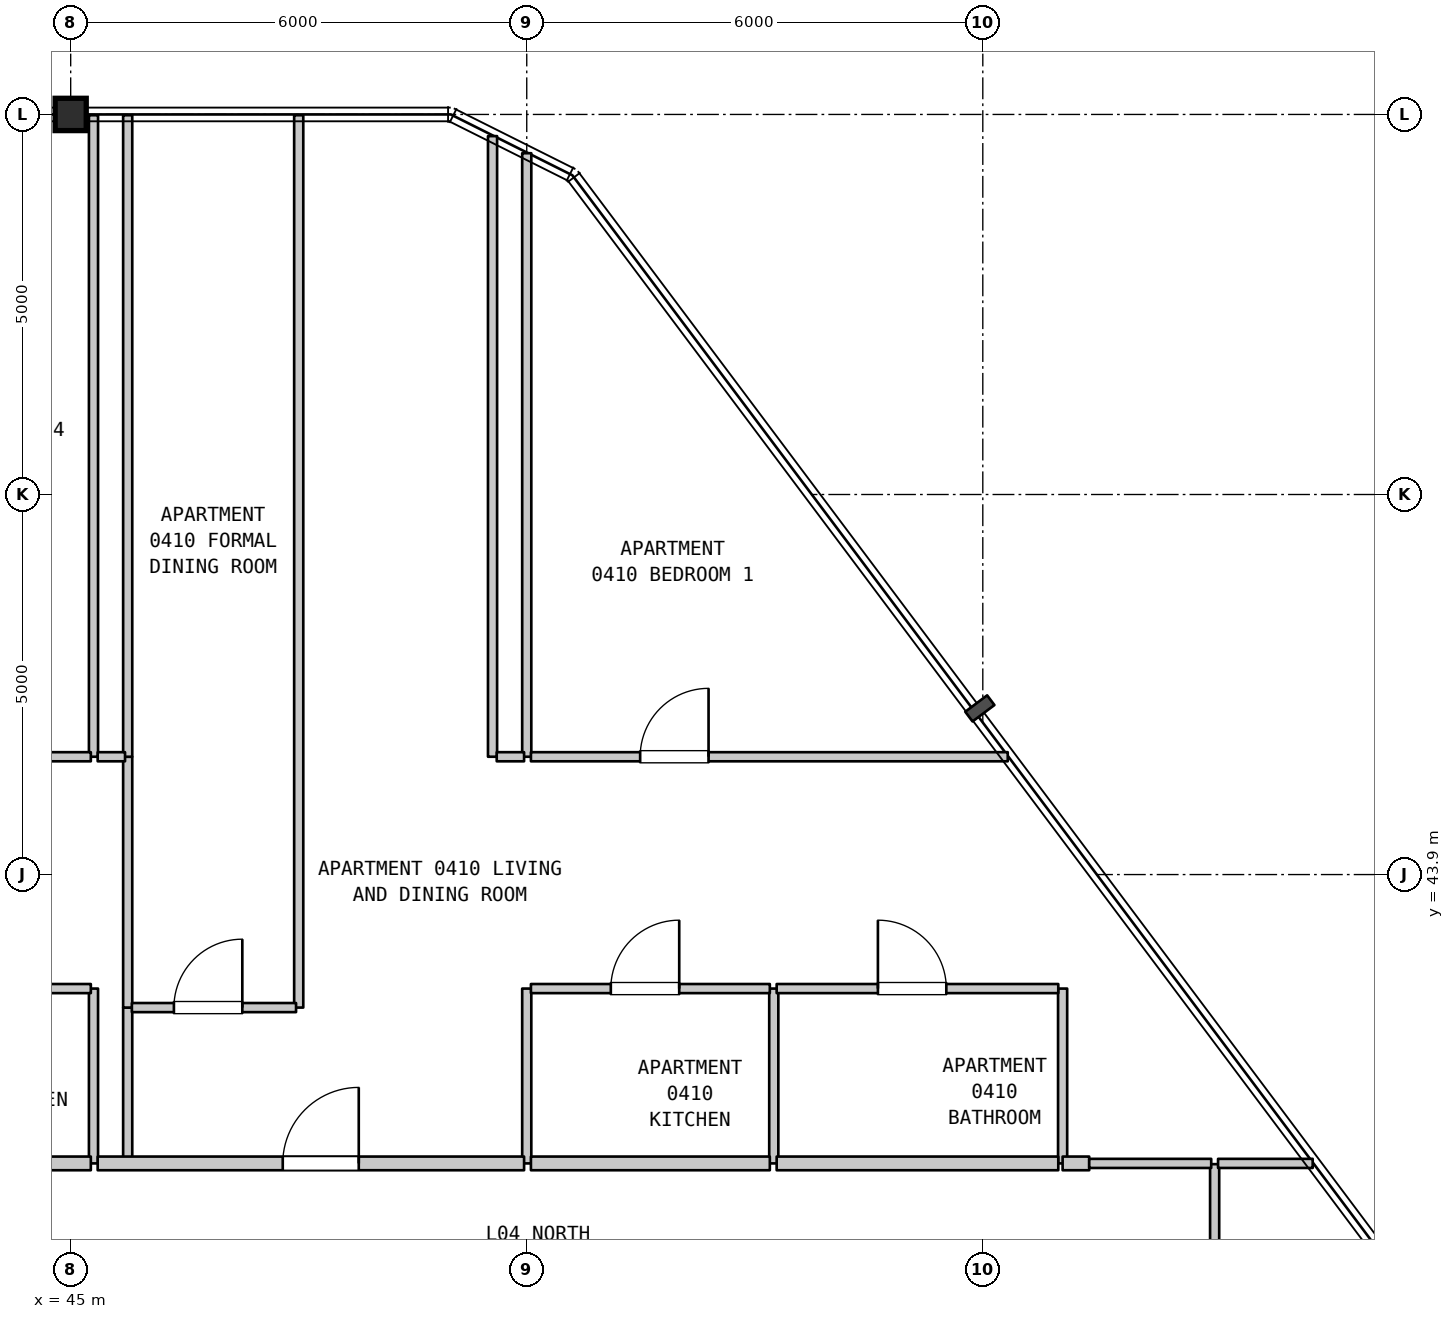
"""IFC4 building model, lengths in metres.
Left out: names, types, materials, properties, quantities, classifications, styles, units other than length and angle.
Written with IfcOpenShell. Run it as: python <this file> out.ifc"""

import sys

from ifc_helpers import new_model, si_unit, direction, frame, frame_2d, origin, origin_2d, place, context, subcontext, project, spatial, rectangle, i_section, extrude, element, fill, save


model = new_model("IFC4")
c1 = context("Model", 3, precision=1e-05, world=origin(), true_north=direction((0.0, 1.0)))
c2 = subcontext(c1, "Body", "Model", "MODEL_VIEW")
j1 = project(units=[si_unit("LENGTHUNIT", "METRE"), si_unit("PLANEANGLEUNIT", "RADIAN")], contexts=[c1])
p1 = place(None, origin())
s1 = spatial("IfcSite", under=j1, at=p1, CompositionType="ELEMENT")
p2 = place(p1, origin())
s2 = spatial("IfcBuilding", under=s1, at=p2, CompositionType="ELEMENT")
p3 = place(p2, frame((0.0, 0.0, 24.0)))
s3 = spatial("IfcBuildingStorey", under=s2, at=p3, CompositionType="ELEMENT", Elevation=24.0)
p4 = place(p3, frame((45.0, 53.9, 0.0), z_axis=(0.0, 0.0, 1.0), x_axis=(1.0, 0.0, 0.0)))
e1 = element("IfcColumn", 1, at=p4, inside=s3, PredefinedType="COLUMN", context=c2, shape_type="SweptSolid", body=[
    extrude(i_section(OverallWidth=0.409, OverallDepth=0.425, WebThickness=0.032, FlangeThickness=0.052, FilletRadius=0.015, at=origin_2d()), origin(), (0.0, 0.0, 1.0), 3.7),
])
p5 = place(p3, frame((45.3, 40.1, 0.0), z_axis=(0.0, 0.0, 1.0), x_axis=(0.0, 1.0, 0.0)))
e2 = element("IfcWall", 2, at=p5, inside=s3, PredefinedType="PARTITIONING", context=c2, shape_type="SweptSolid", body=[
    extrude(rectangle(XDim=2.3, YDim=0.12, at=frame_2d((1.15, 0.0))), origin(), (0.0, 0.0, 1.0), 3.385),
])
p6 = place(p3, frame((45.3, 45.45, 0.0), z_axis=(0.0, 0.0, 1.0), x_axis=(0.0, 1.0, 0.0)))
e3 = element("IfcWall", 3, at=p6, inside=s3, PredefinedType="PARTITIONING", context=c2, shape_type="SweptSolid", body=[
    extrude(rectangle(XDim=8.44, YDim=0.12, at=frame_2d((4.22, 0.0))), origin(), (0.0, 0.0, 1.0), 3.385),
])
p7 = place(p3, frame((45.75, 40.1, 0.0), z_axis=(0.0, 0.0, 1.0), x_axis=(0.0, 1.0, 0.0)))
e4 = element("IfcWall", 4, at=p7, inside=s3, PredefinedType="PARTITIONING", context=c2, shape_type="SweptSolid", body=[
    extrude(rectangle(XDim=2.05, YDim=0.12, at=frame_2d((1.025, 0.0))), origin(), (0.0, 0.0, 1.0), 3.385),
])
p8 = place(p3, frame((45.75, 42.15, 0.0), z_axis=(0.0, 0.0, 1.0), x_axis=(0.0, 1.0, 0.0)))
e5 = element("IfcWall", 5, at=p8, inside=s3, PredefinedType="PARTITIONING", context=c2, shape_type="SweptSolid", body=[
    extrude(rectangle(XDim=3.3, YDim=0.12, at=frame_2d((1.65, 0.0))), origin(), (0.0, 0.0, 1.0), 3.385),
])
p9 = place(p3, frame((45.75, 45.45, 0.0), z_axis=(0.0, 0.0, 1.0), x_axis=(0.0, 1.0, 0.0)))
e6 = element("IfcWall", 6, at=p9, inside=s3, PredefinedType="PARTITIONING", context=c2, shape_type="SweptSolid", body=[
    extrude(rectangle(XDim=8.44, YDim=0.12, at=frame_2d((4.22, 0.0))), origin(), (0.0, 0.0, 1.0), 3.385),
])
p10 = place(p3, frame((48.0, 42.15, 0.0), z_axis=(0.0, 0.0, 1.0), x_axis=(0.0, 1.0, 0.0)))
e7 = element("IfcWall", 7, at=p10, inside=s3, PredefinedType="PARTITIONING", context=c2, shape_type="SweptSolid", body=[
    extrude(rectangle(XDim=11.74, YDim=0.12, at=frame_2d((5.87, 0.0))), origin(), (0.0, 0.0, 1.0), 3.385),
])
p11 = place(p3, frame((50.55, 45.45, 0.0), z_axis=(0.0, 0.0, 1.0), x_axis=(0.0, 1.0, 0.0)))
e8 = element("IfcWall", 8, at=p11, inside=s3, PredefinedType="PARTITIONING", context=c2, shape_type="SweptSolid", body=[
    extrude(rectangle(XDim=8.165, YDim=0.12, at=frame_2d((4.083, 0.0))), origin(), (0.0, 0.0, 1.0), 3.385),
])
p12 = place(p3, frame((51.0, 40.1, 0.0), z_axis=(0.0, 0.0, 1.0), x_axis=(0.0, 1.0, 0.0)))
e9 = element("IfcWall", 9, at=p12, inside=s3, PredefinedType="PARTITIONING", context=c2, shape_type="SweptSolid", body=[
    extrude(rectangle(XDim=2.3, YDim=0.12, at=frame_2d((1.15, 0.0))), origin(), (0.0, 0.0, 1.0), 3.385),
])
p13 = place(p3, frame((51.0, 45.45, 0.0), z_axis=(0.0, 0.0, 1.0), x_axis=(0.0, 1.0, 0.0)))
e10 = element("IfcWall", 10, at=p13, inside=s3, PredefinedType="PARTITIONING", context=c2, shape_type="SweptSolid", body=[
    extrude(rectangle(XDim=7.94, YDim=0.12, at=frame_2d((3.97, 0.0))), origin(), (0.0, 0.0, 1.0), 3.385),
])
for number, where, z_axis, x_axis in (
    (11, (54.25, 40.1, 0.0), (0.0, 0.0, 1.0), (0.0, 1.0, 0.0)),
    (12, (58.05, 40.1, 0.0), (0.0, 0.0, 1.0), (0.0, 1.0, 0.0)),
):
    element("IfcWall", number, at=place(p3, frame(where, z_axis=z_axis, x_axis=x_axis)), inside=s3, PredefinedType="PARTITIONING", context=c2, shape_type="SweptSolid", body=[
        extrude(rectangle(XDim=2.3, YDim=0.12, at=frame_2d((1.15, 0.0))), origin(), (0.0, 0.0, 1.0), 3.385),
    ])
p14 = place(p3, frame((60.05, 37.89, 0.0), z_axis=(0.0, 0.0, 1.0), x_axis=(0.0, 1.0, 0.0)))
e13 = element("IfcWall", 13, at=p14, inside=s3, PredefinedType="PARTITIONING", context=c2, shape_type="SweptSolid", body=[
    extrude(rectangle(XDim=2.2, YDim=0.12, at=frame_2d((1.1, 0.0))), origin(), (0.0, 0.0, 1.0), 3.385),
])
p15 = place(p3, frame((40.639, 40.1, 0.0), z_axis=(0.0, 0.0, 1.0), x_axis=(1.0, 0.0, 0.0)))
e14 = element("IfcWall", 14, at=p15, inside=s3, PredefinedType="STANDARD", context=c2, shape_type="SweptSolid", body=[
    extrude(rectangle(XDim=4.626, YDim=0.18, at=frame_2d((2.313, 0.0))), origin(), (0.0, 0.0, 1.0), 3.385),
])
p16 = place(p3, frame((45.355, 40.1, 0.0), z_axis=(0.0, 0.0, 1.0), x_axis=(1.0, 0.0, 0.0)))
e15 = element("IfcWall", 15, at=p16, inside=s3, PredefinedType="STANDARD", context=c2, shape_type="SweptSolid", body=[
    extrude(rectangle(XDim=5.61, YDim=0.18, at=frame_2d((2.805, 0.0))), origin(), (0.0, 0.0, 1.0), 3.385),
])
p17 = place(p16, frame((2.435, 0.0, 0.0)))
e16 = element("IfcOpeningElement", 16, at=p17, cuts=e15, PredefinedType="OPENING", context=c2, shape_type="SweptSolid", body=[
    extrude(rectangle(XDim=1.0, YDim=2.15, at=frame_2d((0.5, 1.075))), frame((0.0, 0.1, 0.0), z_axis=(0.0, -1.0, 0.0), x_axis=(1.0, 0.0, 0.0)), (0.0, 0.0, 1.0), 0.2),
])
p18 = place(p3, frame((51.055, 40.1, 0.0), z_axis=(0.0, 0.0, 1.0), x_axis=(1.0, 0.0, 0.0)))
e17 = element("IfcWall", 17, at=p18, inside=s3, PredefinedType="STANDARD", context=c2, shape_type="SweptSolid", body=[
    extrude(rectangle(XDim=3.143, YDim=0.18, at=frame_2d((1.572, 0.0))), origin(), (0.0, 0.0, 1.0), 3.385),
])
p19 = place(p3, frame((54.288, 40.1, 0.0), z_axis=(0.0, 0.0, 1.0), x_axis=(1.0, 0.0, 0.0)))
e18 = element("IfcWall", 18, at=p19, inside=s3, PredefinedType="STANDARD", context=c2, shape_type="SweptSolid", body=[
    extrude(rectangle(XDim=3.705, YDim=0.18, at=frame_2d((1.853, 0.0))), origin(), (0.0, 0.0, 1.0), 3.385),
])
p20 = place(p3, frame((58.05, 40.1, 0.0), z_axis=(0.0, 0.0, 1.0), x_axis=(1.0, 0.0, 0.0)))
e19 = element("IfcWall", 19, at=p20, inside=s3, PredefinedType="STANDARD", context=c2, shape_type="SweptSolid", body=[
    extrude(rectangle(XDim=0.35, YDim=0.18, at=frame_2d((0.175, 0.0))), origin(), (0.0, 0.0, 1.0), 3.385),
])
p21 = place(p3, frame((58.4, 40.1, 0.0), z_axis=(0.0, 0.0, 1.0), x_axis=(1.0, 0.0, 0.0)))
e20 = element("IfcWall", 20, at=p21, inside=s3, PredefinedType="PARTITIONING", context=c2, shape_type="SweptSolid", body=[
    extrude(rectangle(XDim=1.605, YDim=0.12, at=frame_2d((0.802, 0.0))), origin(), (0.0, 0.0, 1.0), 3.385),
])
p22 = place(p3, frame((60.095, 40.1, 0.0), z_axis=(0.0, 0.0, 1.0), x_axis=(1.0, 0.0, 0.0)))
e21 = element("IfcWall", 21, at=p22, inside=s3, PredefinedType="PARTITIONING", context=c2, shape_type="SweptSolid", body=[
    extrude(rectangle(XDim=1.245, YDim=0.12, at=frame_2d((0.623, 0.0))), origin(), (0.0, 0.0, 1.0), 3.385),
])
p23 = place(p3, frame((45.805, 42.15, 0.0), z_axis=(0.0, 0.0, 1.0), x_axis=(1.0, 0.0, 0.0)))
e22 = element("IfcWall", 22, at=p23, inside=s3, PredefinedType="PARTITIONING", context=c2, shape_type="SweptSolid", body=[
    extrude(rectangle(XDim=2.16, YDim=0.12, at=frame_2d((1.08, 0.0))), origin(), (0.0, 0.0, 1.0), 3.385),
])
p24 = place(p23, frame((0.553, 0.0, 0.0)))
e23 = element("IfcOpeningElement", 23, at=p24, cuts=e22, PredefinedType="OPENING", context=c2, shape_type="SweptSolid", body=[
    extrude(rectangle(XDim=0.9, YDim=2.15, at=frame_2d((0.45, 1.075))), frame((0.0, 0.07, 0.0), z_axis=(0.0, -1.0, 0.0), x_axis=(1.0, 0.0, 0.0)), (0.0, 0.0, 1.0), 0.14),
])
p25 = place(p3, frame((40.639, 42.4, 0.0), z_axis=(0.0, 0.0, 1.0), x_axis=(1.0, 0.0, 0.0)))
e24 = element("IfcWall", 24, at=p25, inside=s3, PredefinedType="PARTITIONING", context=c2, shape_type="SweptSolid", body=[
    extrude(rectangle(XDim=4.626, YDim=0.12, at=frame_2d((2.313, 0.0))), origin(), (0.0, 0.0, 1.0), 3.385),
])
p26 = place(p25, frame((1.791, 0.0, 0.0)))
e25 = element("IfcOpeningElement", 25, at=p26, cuts=e24, PredefinedType="OPENING", context=c2, shape_type="SweptSolid", body=[
    extrude(rectangle(XDim=0.9, YDim=2.15, at=frame_2d((0.45, 1.075))), frame((0.0, 0.07, 0.0), z_axis=(0.0, -1.0, 0.0), x_axis=(1.0, 0.0, 0.0)), (0.0, 0.0, 1.0), 0.14),
])
p27 = place(p3, frame((51.055, 42.4, 0.0), z_axis=(0.0, 0.0, 1.0), x_axis=(1.0, 0.0, 0.0)))
e26 = element("IfcWall", 26, at=p27, inside=s3, PredefinedType="PARTITIONING", context=c2, shape_type="SweptSolid", body=[
    extrude(rectangle(XDim=3.143, YDim=0.12, at=frame_2d((1.572, 0.0))), origin(), (0.0, 0.0, 1.0), 3.385),
])
p28 = place(p27, frame((1.051, 0.0, 0.0)))
e27 = element("IfcOpeningElement", 27, at=p28, cuts=e26, PredefinedType="OPENING", context=c2, shape_type="SweptSolid", body=[
    extrude(rectangle(XDim=0.9, YDim=2.15, at=frame_2d((0.45, 1.075))), frame((0.0, 0.07, 0.0), z_axis=(0.0, -1.0, 0.0), x_axis=(1.0, 0.0, 0.0)), (0.0, 0.0, 1.0), 0.14),
])
p29 = place(p3, frame((54.288, 42.4, 0.0), z_axis=(0.0, 0.0, 1.0), x_axis=(1.0, 0.0, 0.0)))
e28 = element("IfcWall", 28, at=p29, inside=s3, PredefinedType="PARTITIONING", context=c2, shape_type="SweptSolid", body=[
    extrude(rectangle(XDim=3.705, YDim=0.12, at=frame_2d((1.853, 0.0))), origin(), (0.0, 0.0, 1.0), 3.385),
])
p30 = place(p29, frame((1.332, 0.0, 0.0)))
e29 = element("IfcOpeningElement", 29, at=p30, cuts=e28, PredefinedType="OPENING", context=c2, shape_type="SweptSolid", body=[
    extrude(rectangle(XDim=0.9, YDim=2.1, at=frame_2d((0.45, 1.05))), frame((0.0, 0.07, 0.0), z_axis=(0.0, -1.0, 0.0), x_axis=(1.0, 0.0, 0.0)), (0.0, 0.0, 1.0), 0.14),
])
p31 = place(p3, frame((33.625, 45.45, 0.0), z_axis=(0.0, 0.0, 1.0), x_axis=(1.0, 0.0, 0.0)))
e30 = element("IfcWall", 30, at=p31, inside=s3, PredefinedType="PARTITIONING", context=c2, shape_type="SweptSolid", body=[
    extrude(rectangle(XDim=11.64, YDim=0.12, at=frame_2d((5.82, 0.0))), origin(), (0.0, 0.0, 1.0), 3.385),
])
p32 = place(p31, frame((1.146, 0.0, 0.0)))
e31 = element("IfcOpeningElement", 31, at=p32, cuts=e30, PredefinedType="OPENING", context=c2, shape_type="SweptSolid", body=[
    extrude(rectangle(XDim=0.9, YDim=2.15, at=frame_2d((0.45, 1.075))), frame((0.0, 0.07, 0.0), z_axis=(0.0, -1.0, 0.0), x_axis=(1.0, 0.0, 0.0)), (0.0, 0.0, 1.0), 0.14),
])
p33 = place(p31, frame((3.834, 0.0, 0.0)))
e32 = element("IfcOpeningElement", 32, at=p33, cuts=e30, PredefinedType="OPENING", context=c2, shape_type="SweptSolid", body=[
    extrude(rectangle(XDim=0.9, YDim=2.15, at=frame_2d((0.45, 1.075))), frame((0.0, 0.07, 0.0), z_axis=(0.0, -1.0, 0.0), x_axis=(1.0, 0.0, 0.0)), (0.0, 0.0, 1.0), 0.14),
])
p34 = place(p31, frame((6.766, 0.0, 0.0)))
e33 = element("IfcOpeningElement", 33, at=p34, cuts=e30, PredefinedType="OPENING", context=c2, shape_type="SweptSolid", body=[
    extrude(rectangle(XDim=0.9, YDim=2.15, at=frame_2d((0.45, 1.075))), frame((0.0, 0.07, 0.0), z_axis=(0.0, -1.0, 0.0), x_axis=(1.0, 0.0, 0.0)), (0.0, 0.0, 1.0), 0.14),
])
p35 = place(p31, frame((9.594, 0.0, 0.0)))
e34 = element("IfcOpeningElement", 34, at=p35, cuts=e30, PredefinedType="OPENING", context=c2, shape_type="SweptSolid", body=[
    extrude(rectangle(XDim=0.9, YDim=2.15, at=frame_2d((0.45, 1.075))), frame((0.0, 0.07, 0.0), z_axis=(0.0, -1.0, 0.0), x_axis=(1.0, 0.0, 0.0)), (0.0, 0.0, 1.0), 0.14),
])
for number, where, z_axis, x_axis in (
    (35, (45.355, 45.45, 0.0), (0.0, 0.0, 1.0), (1.0, 0.0, 0.0)),
    (36, (50.605, 45.45, 0.0), (0.0, 0.0, 1.0), (1.0, 0.0, 0.0)),
):
    element("IfcWall", number, at=place(p3, frame(where, z_axis=z_axis, x_axis=x_axis)), inside=s3, PredefinedType="PARTITIONING", context=c2, shape_type="SweptSolid", body=[
        extrude(rectangle(XDim=0.36, YDim=0.12, at=frame_2d((0.18, 0.0))), origin(), (0.0, 0.0, 1.0), 3.385),
    ])
p36 = place(p3, frame((51.055, 45.45, 0.0), z_axis=(0.0, 0.0, 1.0), x_axis=(1.0, 0.0, 0.0)))
e37 = element("IfcWall", 37, at=p36, inside=s3, PredefinedType="PARTITIONING", context=c2, shape_type="SweptSolid", body=[
    extrude(rectangle(XDim=6.273, YDim=0.12, at=frame_2d((3.136, 0.0))), origin(), (0.0, 0.0, 1.0), 3.385),
])
p37 = place(p36, frame((1.437, 0.0, 0.0)))
e38 = element("IfcOpeningElement", 38, at=p37, cuts=e37, PredefinedType="OPENING", context=c2, shape_type="SweptSolid", body=[
    extrude(rectangle(XDim=0.9, YDim=2.15, at=frame_2d((0.45, 1.075))), frame((0.0, 0.07, 0.0), z_axis=(0.0, -1.0, 0.0), x_axis=(1.0, 0.0, 0.0)), (0.0, 0.0, 1.0), 0.14),
])
p38 = place(p17, origin())
e39 = element("IfcDoor", 39, at=p38, inside=s3, OperationType="SINGLE_SWING_RIGHT", PredefinedType="DOOR", context=c2, shape_type="SweptSolid", body=[
    extrude(rectangle(XDim=1.0, YDim=2.15, at=frame_2d((0.5, 1.075))), frame((0.0, 0.025, 0.0), z_axis=(0.0, -1.0, 0.0), x_axis=(1.0, 0.0, 0.0)), (0.0, 0.0, 1.0), 0.05),
])
fill(e16, e39)
p39 = place(p24, origin())
e40 = element("IfcDoor", 40, at=p39, inside=s3, OperationType="SINGLE_SWING_RIGHT", PredefinedType="DOOR", context=c2, shape_type="SweptSolid", body=[
    extrude(rectangle(XDim=0.9, YDim=2.15, at=frame_2d((0.45, 1.075))), frame((0.0, 0.025, 0.0), z_axis=(0.0, -1.0, 0.0), x_axis=(1.0, 0.0, 0.0)), (0.0, 0.0, 1.0), 0.05),
])
fill(e23, e40)
p40 = place(p28, origin())
e41 = element("IfcDoor", 41, at=p40, inside=s3, OperationType="SINGLE_SWING_RIGHT", PredefinedType="DOOR", context=c2, shape_type="SweptSolid", body=[
    extrude(rectangle(XDim=0.9, YDim=2.15, at=frame_2d((0.45, 1.075))), frame((0.0, 0.025, 0.0), z_axis=(0.0, -1.0, 0.0), x_axis=(1.0, 0.0, 0.0)), (0.0, 0.0, 1.0), 0.05),
])
fill(e27, e41)
p41 = place(p30, origin())
e42 = element("IfcDoor", 42, at=p41, inside=s3, OperationType="SINGLE_SWING_LEFT", PredefinedType="DOOR", context=c2, shape_type="SweptSolid", body=[
    extrude(rectangle(XDim=0.9, YDim=2.1, at=frame_2d((0.45, 1.05))), frame((0.0, 0.025, 0.0), z_axis=(0.0, -1.0, 0.0), x_axis=(1.0, 0.0, 0.0)), (0.0, 0.0, 1.0), 0.05),
])
fill(e29, e42)
p42 = place(p37, origin())
e43 = element("IfcDoor", 43, at=p42, inside=s3, OperationType="SINGLE_SWING_RIGHT", PredefinedType="DOOR", context=c2, shape_type="SweptSolid", body=[
    extrude(rectangle(XDim=0.9, YDim=2.15, at=frame_2d((0.45, 1.075))), frame((0.0, 0.025, 0.0), z_axis=(0.0, -1.0, 0.0), x_axis=(1.0, 0.0, 0.0)), (0.0, 0.0, 1.0), 0.05),
])
fill(e38, e43)
save(model, sys.argv[1])
